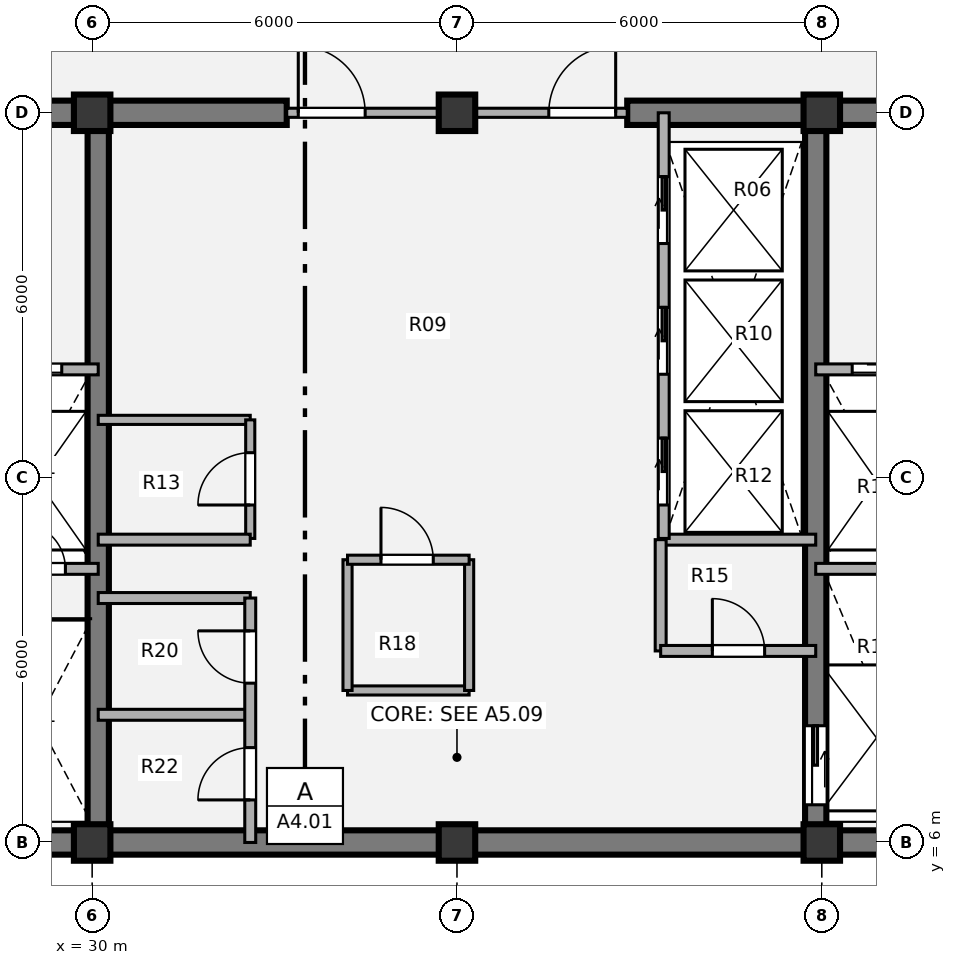
"""IFC4 building model, lengths in metres.
Left out: names, types, materials, properties, quantities, classifications, styles, units other than length and angle.
Written with IfcOpenShell. Run it as: python <this file> out.ifc"""

import sys

from ifc_helpers import new_model, si_unit, direction, frame, frame_2d, origin, origin_2d, place, context, subcontext, project, spatial, rectangle, extrude, source, transform, mapped, element, fill, save


model = new_model("IFC4")
c1 = context("Model", 3, precision=1e-05, world=origin(), true_north=direction((0.0, 1.0)))
c2 = subcontext(c1, "Body", "Model", "MODEL_VIEW")
j1 = project(units=[si_unit("LENGTHUNIT", "METRE"), si_unit("PLANEANGLEUNIT", "RADIAN")], contexts=[c1])
p1 = place(None, origin())
s1 = spatial("IfcSite", under=j1, at=p1, CompositionType="ELEMENT")
p2 = place(p1, origin())
s2 = spatial("IfcBuilding", under=s1, at=p2, CompositionType="ELEMENT")
p3 = place(p2, frame((0.0, 0.0, 291.06)))
s3 = spatial("IfcBuildingStorey", under=s2, at=p3, CompositionType="ELEMENT", Elevation=291.06)
m1 = source(origin(), c2, "Body", "SweptSolid", [
    extrude(rectangle(XDim=0.6, YDim=0.6, at=origin_2d()), origin(), (0.0, 0.0, 1.0), 4.86),
])
for number, where, z_axis, x_axis in (
    (1, (30.0, 6.0, 0.0), (0.0, 0.0, 1.0), (1.0, 0.0, 0.0)),
    (2, (36.0, 6.0, 0.0), (0.0, 0.0, 1.0), (1.0, 0.0, 0.0)),
    (3, (42.0, 6.0, 0.0), (0.0, 0.0, 1.0), (1.0, 0.0, 0.0)),
    (4, (30.0, 18.0, 0.0), (0.0, 0.0, 1.0), (1.0, 0.0, 0.0)),
    (5, (36.0, 18.0, 0.0), (0.0, 0.0, 1.0), (1.0, 0.0, 0.0)),
    (6, (42.0, 18.0, 0.0), (0.0, 0.0, 1.0), (1.0, 0.0, 0.0)),
):
    element("IfcColumn", number, at=place(p3, frame(where, z_axis=z_axis, x_axis=x_axis)), inside=s3, PredefinedType="COLUMN", context=c2, shape_type="MappedRepresentation", body=[
        mapped(m1, transform((0.0, 0.0, 0.0), x_axis=(1.0, 0.0, 0.0), y_axis=(0.0, 1.0, 0.0), z_axis=(0.0, 0.0, 1.0), scale=1.0)),
    ])
p4 = place(p3, frame((48.2, 6.0, 0.0), z_axis=(0.0, 0.0, 1.0), x_axis=(-1.0, 0.0, 0.0)))
e7 = element("IfcWall", 7, at=p4, inside=s3, PredefinedType="SHEAR", context=c2, shape_type="SweptSolid", body=[
    extrude(rectangle(XDim=24.4, YDim=0.4, at=frame_2d((12.2, 0.0))), origin(), (0.0, 0.0, 1.0), 4.86),
])
p5 = place(p3, frame((23.8, 18.0, 0.0), z_axis=(0.0, 0.0, 1.0), x_axis=(1.0, 0.0, 0.0)))
e8 = element("IfcWall", 8, at=p5, inside=s3, PredefinedType="SHEAR", context=c2, shape_type="SweptSolid", body=[
    extrude(rectangle(XDim=9.4, YDim=0.4, at=frame_2d((4.7, 0.0))), origin(), (0.0, 0.0, 1.0), 4.86),
])
p6 = place(p5, frame((2.95, 0.0, 0.0)))
e9 = element("IfcOpeningElement", 9, at=p6, cuts=e8, PredefinedType="OPENING", context=c2, shape_type="SweptSolid", body=[
    extrude(rectangle(XDim=1.1, YDim=2.1, at=origin_2d()), frame((0.55, 0.21, 1.05), z_axis=(0.0, -1.0, 0.0), x_axis=(1.0, 0.0, 0.0)), (0.0, 0.0, 1.0), 0.42),
])
p7 = place(p3, frame((38.8, 18.0, 0.0), z_axis=(0.0, 0.0, 1.0), x_axis=(1.0, 0.0, 0.0)))
e10 = element("IfcWall", 10, at=p7, inside=s3, PredefinedType="SHEAR", context=c2, shape_type="SweptSolid", body=[
    extrude(rectangle(XDim=9.4, YDim=0.4, at=frame_2d((4.7, 0.0))), origin(), (0.0, 0.0, 1.0), 4.86),
])
p8 = place(p7, frame((5.45, 0.0, 0.0)))
e11 = element("IfcOpeningElement", 11, at=p8, cuts=e10, PredefinedType="OPENING", context=c2, shape_type="SweptSolid", body=[
    extrude(rectangle(XDim=1.1, YDim=2.1, at=origin_2d()), frame((0.55, 0.21, 1.05), z_axis=(0.0, -1.0, 0.0), x_axis=(1.0, 0.0, 0.0)), (0.0, 0.0, 1.0), 0.42),
])
p9 = place(p3, frame((30.1, 6.0, 0.0), z_axis=(0.0, 0.0, 1.0), x_axis=(0.0, 1.0, 0.0)))
e12 = element("IfcWall", 12, at=p9, inside=s3, PredefinedType="SHEAR", context=c2, shape_type="SweptSolid", body=[
    extrude(rectangle(XDim=12.0, YDim=0.35, at=frame_2d((6.0, 0.0))), origin(), (0.0, 0.0, 1.0), 4.86),
])
p10 = place(p3, frame((41.9, 18.0, 0.0), z_axis=(0.0, 0.0, 1.0), x_axis=(0.0, -1.0, 0.0)))
e13 = element("IfcWall", 13, at=p10, inside=s3, PredefinedType="SHEAR", context=c2, shape_type="SweptSolid", body=[
    extrude(rectangle(XDim=12.0, YDim=0.35, at=frame_2d((6.0, 0.0))), origin(), (0.0, 0.0, 1.0), 4.86),
])
p11 = place(p10, frame((10.08, 0.0, 0.0)))
e14 = element("IfcOpeningElement", 14, at=p11, cuts=e13, PredefinedType="OPENING", context=c2, shape_type="SweptSolid", body=[
    extrude(rectangle(XDim=1.3, YDim=2.1, at=origin_2d()), frame((0.65, 0.185, 1.05), z_axis=(0.0, -1.0, 0.0), x_axis=(1.0, 0.0, 0.0)), (0.0, 0.0, 1.0), 0.37),
])
p12 = place(p3, frame((30.1, 12.95, 0.0), z_axis=(0.0, 0.0, 1.0), x_axis=(1.0, 0.0, 0.0)))
e15 = element("IfcWall", 15, at=p12, inside=s3, PredefinedType="PARTITIONING", context=c2, shape_type="SweptSolid", body=[
    extrude(rectangle(XDim=2.5, YDim=0.15, at=frame_2d((1.25, 0.0))), origin(), (0.0, 0.0, 1.0), 4.58),
])
p13 = place(p3, frame((32.6, 11.0, 0.0), z_axis=(0.0, 0.0, 1.0), x_axis=(0.0, 1.0, 0.0)))
e16 = element("IfcWall", 16, at=p13, inside=s3, PredefinedType="PARTITIONING", context=c2, shape_type="SweptSolid", body=[
    extrude(rectangle(XDim=1.95, YDim=0.15, at=frame_2d((0.975, 0.0))), origin(), (0.0, 0.0, 1.0), 4.58),
])
p14 = place(p13, frame((0.55, 0.0, 0.0)))
e17 = element("IfcOpeningElement", 17, at=p14, cuts=e16, PredefinedType="OPENING", context=c2, shape_type="SweptSolid", body=[
    extrude(rectangle(XDim=0.86, YDim=2.1, at=origin_2d()), frame((0.43, 0.085, 1.05), z_axis=(0.0, -1.0, 0.0), x_axis=(1.0, 0.0, 0.0)), (0.0, 0.0, 1.0), 0.17),
])
p15 = place(p3, frame((34.2, 8.5, 0.0), z_axis=(0.0, 0.0, 1.0), x_axis=(1.0, 0.0, 0.0)))
e18 = element("IfcWall", 18, at=p15, inside=s3, PredefinedType="PARTITIONING", context=c2, shape_type="SweptSolid", body=[
    extrude(rectangle(XDim=2.0, YDim=0.15, at=frame_2d((1.0, 0.0))), origin(), (0.0, 0.0, 1.0), 4.58),
])
p16 = place(p3, frame((34.2, 8.5, 0.0), z_axis=(0.0, 0.0, 1.0), x_axis=(0.0, 1.0, 0.0)))
e19 = element("IfcWall", 19, at=p16, inside=s3, PredefinedType="PARTITIONING", context=c2, shape_type="SweptSolid", body=[
    extrude(rectangle(XDim=2.15, YDim=0.15, at=frame_2d((1.075, 0.0))), origin(), (0.0, 0.0, 1.0), 4.58),
])
p17 = place(p3, frame((36.2, 8.5, 0.0), z_axis=(0.0, 0.0, 1.0), x_axis=(0.0, 1.0, 0.0)))
e20 = element("IfcWall", 20, at=p17, inside=s3, PredefinedType="PARTITIONING", context=c2, shape_type="SweptSolid", body=[
    extrude(rectangle(XDim=2.15, YDim=0.15, at=frame_2d((1.075, 0.0))), origin(), (0.0, 0.0, 1.0), 3.795),
])
p18 = place(p3, frame((34.2, 10.65, 0.0), z_axis=(0.0, 0.0, 1.0), x_axis=(1.0, 0.0, 0.0)))
e21 = element("IfcWall", 21, at=p18, inside=s3, PredefinedType="PARTITIONING", context=c2, shape_type="SweptSolid", body=[
    extrude(rectangle(XDim=2.0, YDim=0.15, at=frame_2d((1.0, 0.0))), origin(), (0.0, 0.0, 1.0), 4.58),
])
p19 = place(p18, frame((0.55, 0.0, 0.0)))
e22 = element("IfcOpeningElement", 22, at=p19, cuts=e21, PredefinedType="OPENING", context=c2, shape_type="SweptSolid", body=[
    extrude(rectangle(XDim=0.86, YDim=2.1, at=origin_2d()), frame((0.43, 0.085, 1.05), z_axis=(0.0, -1.0, 0.0), x_axis=(1.0, 0.0, 0.0)), (0.0, 0.0, 1.0), 0.17),
])
p20 = place(p3, frame((30.1, 10.98, 0.0), z_axis=(0.0, 0.0, 1.0), x_axis=(1.0, 0.0, 0.0)))
e23 = element("IfcWall", 23, at=p20, inside=s3, PredefinedType="PARTITIONING", context=c2, shape_type="SweptSolid", body=[
    extrude(rectangle(XDim=2.5, YDim=0.18, at=frame_2d((1.25, 0.0))), origin(), (0.0, 0.0, 1.0), 4.58),
])
p21 = place(p3, frame((39.35, 10.98, 0.0), z_axis=(0.0, 0.0, 1.0), x_axis=(1.0, 0.0, 0.0)))
e24 = element("IfcWall", 24, at=p21, inside=s3, PredefinedType="PARTITIONING", context=c2, shape_type="SweptSolid", body=[
    extrude(rectangle(XDim=2.55, YDim=0.18, at=frame_2d((1.275, 0.0))), origin(), (0.0, 0.0, 1.0), 4.58),
])
for number, where, z_axis, x_axis in (
    (25, (30.1, 8.1, 0.0), (0.0, 0.0, 1.0), (1.0, 0.0, 0.0)),
    (26, (30.1, 10.02, 0.0), (0.0, 0.0, 1.0), (1.0, 0.0, 0.0)),
):
    element("IfcWall", number, at=place(p3, frame(where, z_axis=z_axis, x_axis=x_axis)), inside=s3, PredefinedType="PARTITIONING", context=c2, shape_type="SweptSolid", body=[
        extrude(rectangle(XDim=2.5, YDim=0.18, at=frame_2d((1.25, 0.0))), origin(), (0.0, 0.0, 1.0), 4.58),
    ])
p22 = place(p3, frame((32.6, 6.0, 0.0), z_axis=(0.0, 0.0, 1.0), x_axis=(0.0, 1.0, 0.0)))
e27 = element("IfcWall", 27, at=p22, inside=s3, PredefinedType="PARTITIONING", context=c2, shape_type="SweptSolid", body=[
    extrude(rectangle(XDim=4.02, YDim=0.18, at=frame_2d((2.01, 0.0))), origin(), (0.0, 0.0, 1.0), 4.58),
])
p23 = place(p22, frame((0.7, 0.0, 0.0)))
e28 = element("IfcOpeningElement", 28, at=p23, cuts=e27, PredefinedType="OPENING", context=c2, shape_type="SweptSolid", body=[
    extrude(rectangle(XDim=0.86, YDim=2.1, at=origin_2d()), frame((0.43, 0.1, 1.05), z_axis=(0.0, -1.0, 0.0), x_axis=(1.0, 0.0, 0.0)), (0.0, 0.0, 1.0), 0.2),
])
p24 = place(p22, frame((2.62, 0.0, 0.0)))
e29 = element("IfcOpeningElement", 29, at=p24, cuts=e27, PredefinedType="OPENING", context=c2, shape_type="SweptSolid", body=[
    extrude(rectangle(XDim=0.86, YDim=2.1, at=origin_2d()), frame((0.43, 0.1, 1.05), z_axis=(0.0, -1.0, 0.0), x_axis=(1.0, 0.0, 0.0)), (0.0, 0.0, 1.0), 0.2),
])
p25 = place(p3, frame((39.35, 9.15, 0.0), z_axis=(0.0, 0.0, 1.0), x_axis=(0.0, 1.0, 0.0)))
e30 = element("IfcWall", 30, at=p25, inside=s3, PredefinedType="PARTITIONING", context=c2, shape_type="SweptSolid", body=[
    extrude(rectangle(XDim=1.83, YDim=0.18, at=frame_2d((0.915, 0.0))), origin(), (0.0, 0.0, 1.0), 4.58),
])
p26 = place(p3, frame((39.35, 9.15, 0.0), z_axis=(0.0, 0.0, 1.0), x_axis=(1.0, 0.0, 0.0)))
e31 = element("IfcWall", 31, at=p26, inside=s3, PredefinedType="PARTITIONING", context=c2, shape_type="SweptSolid", body=[
    extrude(rectangle(XDim=2.55, YDim=0.18, at=frame_2d((1.275, 0.0))), origin(), (0.0, 0.0, 1.0), 4.58),
])
p27 = place(p26, frame((0.85, 0.0, 0.0)))
e32 = element("IfcOpeningElement", 32, at=p27, cuts=e31, PredefinedType="OPENING", context=c2, shape_type="SweptSolid", body=[
    extrude(rectangle(XDim=0.86, YDim=2.1, at=origin_2d()), frame((0.43, 0.1, 1.05), z_axis=(0.0, -1.0, 0.0), x_axis=(1.0, 0.0, 0.0)), (0.0, 0.0, 1.0), 0.2),
])
p28 = place(p3, frame((33.2, 18.0, 0.0), z_axis=(0.0, 0.0, 1.0), x_axis=(1.0, 0.0, 0.0)))
e33 = element("IfcWall", 33, at=p28, inside=s3, PredefinedType="PARTITIONING", context=c2, shape_type="SweptSolid", body=[
    extrude(rectangle(XDim=5.6, YDim=0.15, at=frame_2d((2.8, 0.0))), origin(), (0.0, 0.0, 1.0), 3.595),
])
p29 = place(p28, frame((0.19, 0.0, 0.0)))
e34 = element("IfcOpeningElement", 34, at=p29, cuts=e33, PredefinedType="OPENING", context=c2, shape_type="SweptSolid", body=[
    extrude(rectangle(XDim=1.1, YDim=2.1, at=origin_2d()), frame((0.55, 0.085, 1.05), z_axis=(0.0, -1.0, 0.0), x_axis=(1.0, 0.0, 0.0)), (0.0, 0.0, 1.0), 0.17),
])
p30 = place(p28, frame((4.31, 0.0, 0.0)))
e35 = element("IfcOpeningElement", 35, at=p30, cuts=e33, PredefinedType="OPENING", context=c2, shape_type="SweptSolid", body=[
    extrude(rectangle(XDim=1.1, YDim=2.1, at=origin_2d()), frame((0.55, 0.085, 1.05), z_axis=(0.0, -1.0, 0.0), x_axis=(1.0, 0.0, 0.0)), (0.0, 0.0, 1.0), 0.17),
])
p31 = place(p3, frame((24.0, 13.78, 0.0), z_axis=(0.0, 0.0, 1.0), x_axis=(1.0, 0.0, 0.0)))
e36 = element("IfcWall", 36, at=p31, inside=s3, PredefinedType="PARTITIONING", context=c2, shape_type="SweptSolid", body=[
    extrude(rectangle(XDim=6.1, YDim=0.18, at=frame_2d((3.05, 0.0))), origin(), (0.0, 0.0, 1.0), 4.58),
])
p32 = place(p31, frame((1.15, 0.0, 0.0)))
e37 = element("IfcOpeningElement", 37, at=p32, cuts=e36, PredefinedType="OPENING", context=c2, shape_type="SweptSolid", body=[
    extrude(rectangle(XDim=1.1, YDim=2.1, at=origin_2d()), frame((0.55, 0.1, 1.05), z_axis=(0.0, -1.0, 0.0), x_axis=(1.0, 0.0, 0.0)), (0.0, 0.0, 1.0), 0.2),
])
p33 = place(p31, frame((4.4, 0.0, 0.0)))
e38 = element("IfcOpeningElement", 38, at=p33, cuts=e36, PredefinedType="OPENING", context=c2, shape_type="SweptSolid", body=[
    extrude(rectangle(XDim=1.1, YDim=2.1, at=origin_2d()), frame((0.55, 0.1, 1.05), z_axis=(0.0, -1.0, 0.0), x_axis=(1.0, 0.0, 0.0)), (0.0, 0.0, 1.0), 0.2),
])
p34 = place(p3, frame((28.15, 10.5, 0.0), z_axis=(0.0, 0.0, 1.0), x_axis=(1.0, 0.0, 0.0)))
e39 = element("IfcWall", 39, at=p34, inside=s3, PredefinedType="PARTITIONING", context=c2, shape_type="SweptSolid", body=[
    extrude(rectangle(XDim=1.95, YDim=0.18, at=frame_2d((0.975, 0.0))), origin(), (0.0, 0.0, 1.0), 4.58),
])
p35 = place(p34, frame((0.65, 0.0, 0.0)))
e40 = element("IfcOpeningElement", 40, at=p35, cuts=e39, PredefinedType="OPENING", context=c2, shape_type="SweptSolid", body=[
    extrude(rectangle(XDim=0.76, YDim=2.05, at=origin_2d()), frame((0.38, 0.1, 1.025), z_axis=(0.0, -1.0, 0.0), x_axis=(1.0, 0.0, 0.0)), (0.0, 0.0, 1.0), 0.2),
])
p36 = place(p3, frame((41.9, 13.78, 0.0), z_axis=(0.0, 0.0, 1.0), x_axis=(1.0, 0.0, 0.0)))
e41 = element("IfcWall", 41, at=p36, inside=s3, PredefinedType="PARTITIONING", context=c2, shape_type="SweptSolid", body=[
    extrude(rectangle(XDim=6.1, YDim=0.18, at=frame_2d((3.05, 0.0))), origin(), (0.0, 0.0, 1.0), 4.58),
])
p37 = place(p36, frame((0.6, 0.0, 0.0)))
e42 = element("IfcOpeningElement", 42, at=p37, cuts=e41, PredefinedType="OPENING", context=c2, shape_type="SweptSolid", body=[
    extrude(rectangle(XDim=1.1, YDim=2.1, at=origin_2d()), frame((0.55, 0.1, 1.05), z_axis=(0.0, -1.0, 0.0), x_axis=(1.0, 0.0, 0.0)), (0.0, 0.0, 1.0), 0.2),
])
p38 = place(p36, frame((3.8, 0.0, 0.0)))
e43 = element("IfcOpeningElement", 43, at=p38, cuts=e41, PredefinedType="OPENING", context=c2, shape_type="SweptSolid", body=[
    extrude(rectangle(XDim=1.1, YDim=2.1, at=origin_2d()), frame((0.55, 0.1, 1.05), z_axis=(0.0, -1.0, 0.0), x_axis=(1.0, 0.0, 0.0)), (0.0, 0.0, 1.0), 0.2),
])
p39 = place(p3, frame((41.9, 10.5, 0.0), z_axis=(0.0, 0.0, 1.0), x_axis=(1.0, 0.0, 0.0)))
e44 = element("IfcWall", 44, at=p39, inside=s3, PredefinedType="PARTITIONING", context=c2, shape_type="SweptSolid", body=[
    extrude(rectangle(XDim=1.95, YDim=0.18, at=frame_2d((0.975, 0.0))), origin(), (0.0, 0.0, 1.0), 4.58),
])
p40 = place(p3, frame((39.4, 11.0, 0.0), z_axis=(0.0, 0.0, 1.0), x_axis=(0.0, 1.0, 0.0)))
e45 = element("IfcWall", 45, at=p40, inside=s3, PredefinedType="PARTITIONING", context=c2, shape_type="SweptSolid", body=[
    extrude(rectangle(XDim=7.0, YDim=0.18, at=frame_2d((3.5, 0.0))), origin(), (0.0, 0.0, 1.0), 4.58),
])
p41 = place(p40, frame((0.55, 0.0, 0.0)))
e46 = element("IfcOpeningElement", 46, at=p41, cuts=e45, PredefinedType="OPENING", context=c2, shape_type="SweptSolid", body=[
    extrude(rectangle(XDim=1.1, YDim=2.1, at=origin_2d()), frame((0.55, 0.1, 1.05), z_axis=(0.0, -1.0, 0.0), x_axis=(1.0, 0.0, 0.0)), (0.0, 0.0, 1.0), 0.2),
])
p42 = place(p40, frame((2.7, 0.0, 0.0)))
e47 = element("IfcOpeningElement", 47, at=p42, cuts=e45, PredefinedType="OPENING", context=c2, shape_type="SweptSolid", body=[
    extrude(rectangle(XDim=1.1, YDim=2.1, at=origin_2d()), frame((0.55, 0.1, 1.05), z_axis=(0.0, -1.0, 0.0), x_axis=(1.0, 0.0, 0.0)), (0.0, 0.0, 1.0), 0.2),
])
p43 = place(p40, frame((4.85, 0.0, 0.0)))
e48 = element("IfcOpeningElement", 48, at=p43, cuts=e45, PredefinedType="OPENING", context=c2, shape_type="SweptSolid", body=[
    extrude(rectangle(XDim=1.1, YDim=2.1, at=origin_2d()), frame((0.55, 0.1, 1.05), z_axis=(0.0, -1.0, 0.0), x_axis=(1.0, 0.0, 0.0)), (0.0, 0.0, 1.0), 0.2),
])
m2 = source(origin(), c2, "Body", "SweptSolid", [
    extrude(rectangle(XDim=0.86, YDim=2.1, at=origin_2d()), frame((0.43, 0.025, 1.05), z_axis=(0.0, -1.0, 0.0), x_axis=(1.0, 0.0, 0.0)), (0.0, 0.0, 1.0), 0.05),
])
p44 = place(p14, origin())
e49 = element("IfcDoor", 49, at=p44, inside=s3, OperationType="SINGLE_SWING_LEFT", PredefinedType="DOOR", context=c2, shape_type="MappedRepresentation", body=[
    mapped(m2, transform((0.0, 0.0, 0.0), x_axis=(1.0, 0.0, 0.0), y_axis=(0.0, 1.0, 0.0), z_axis=(0.0, 0.0, 1.0), scale=1.0)),
])
fill(e17, e49)
p45 = place(p19, origin())
e50 = element("IfcDoor", 50, at=p45, inside=s3, OperationType="SINGLE_SWING_LEFT", PredefinedType="DOOR", context=c2, shape_type="MappedRepresentation", body=[
    mapped(m2, transform((0.0, 0.0, 0.0), x_axis=(1.0, 0.0, 0.0), y_axis=(0.0, 1.0, 0.0), z_axis=(0.0, 0.0, 1.0), scale=1.0)),
])
fill(e22, e50)
p46 = place(p23, origin())
e51 = element("IfcDoor", 51, at=p46, inside=s3, OperationType="SINGLE_SWING_LEFT", PredefinedType="DOOR", context=c2, shape_type="MappedRepresentation", body=[
    mapped(m2, transform((0.0, 0.0, 0.0), x_axis=(1.0, 0.0, 0.0), y_axis=(0.0, 1.0, 0.0), z_axis=(0.0, 0.0, 1.0), scale=1.0)),
])
fill(e28, e51)
p47 = place(p24, origin())
e52 = element("IfcDoor", 52, at=p47, inside=s3, OperationType="SINGLE_SWING_RIGHT", PredefinedType="DOOR", context=c2, shape_type="MappedRepresentation", body=[
    mapped(m2, transform((0.0, 0.0, 0.0), x_axis=(1.0, 0.0, 0.0), y_axis=(0.0, 1.0, 0.0), z_axis=(0.0, 0.0, 1.0), scale=1.0)),
])
fill(e29, e52)
p48 = place(p27, origin())
e53 = element("IfcDoor", 53, at=p48, inside=s3, OperationType="SINGLE_SWING_LEFT", PredefinedType="DOOR", context=c2, shape_type="MappedRepresentation", body=[
    mapped(m2, transform((0.0, 0.0, 0.0), x_axis=(1.0, 0.0, 0.0), y_axis=(0.0, 1.0, 0.0), z_axis=(0.0, 0.0, 1.0), scale=1.0)),
])
fill(e32, e53)
m3 = source(origin(), c2, "Body", "SweptSolid", [
    extrude(rectangle(XDim=1.1, YDim=2.1, at=origin_2d()), frame((0.55, 0.025, 1.05), z_axis=(0.0, -1.0, 0.0), x_axis=(1.0, 0.0, 0.0)), (0.0, 0.0, 1.0), 0.05),
])
p49 = place(p29, origin())
e54 = element("IfcDoor", 54, at=p49, inside=s3, OperationType="SINGLE_SWING_LEFT", PredefinedType="DOOR", context=c2, shape_type="MappedRepresentation", body=[
    mapped(m3, transform((0.0, 0.0, 0.0), x_axis=(1.0, 0.0, 0.0), y_axis=(0.0, 1.0, 0.0), z_axis=(0.0, 0.0, 1.0), scale=1.0)),
])
fill(e34, e54)
p50 = place(p30, origin())
e55 = element("IfcDoor", 55, at=p50, inside=s3, OperationType="SINGLE_SWING_RIGHT", PredefinedType="DOOR", context=c2, shape_type="MappedRepresentation", body=[
    mapped(m3, transform((0.0, 0.0, 0.0), x_axis=(1.0, 0.0, 0.0), y_axis=(0.0, 1.0, 0.0), z_axis=(0.0, 0.0, 1.0), scale=1.0)),
])
fill(e35, e55)
m4 = source(origin(), c2, "Body", "SweptSolid", [
    extrude(rectangle(XDim=1.1, YDim=2.1, at=origin_2d()), frame((0.55, 0.025, 1.05), z_axis=(0.0, -1.0, 0.0), x_axis=(1.0, 0.0, 0.0)), (0.0, 0.0, 1.0), 0.05),
])
p51 = place(p33, origin())
e56 = element("IfcDoor", 56, at=p51, inside=s3, OperationType="SLIDING_TO_LEFT", PredefinedType="DOOR", context=c2, shape_type="MappedRepresentation", body=[
    mapped(m4, transform((0.0, 0.0, 0.0), x_axis=(1.0, 0.0, 0.0), y_axis=(0.0, 1.0, 0.0), z_axis=(0.0, 0.0, 1.0), scale=1.0)),
])
fill(e38, e56)
m5 = source(origin(), c2, "Body", "SweptSolid", [
    extrude(rectangle(XDim=0.76, YDim=2.05, at=origin_2d()), frame((0.38, 0.025, 1.025), z_axis=(0.0, -1.0, 0.0), x_axis=(1.0, 0.0, 0.0)), (0.0, 0.0, 1.0), 0.05),
])
p52 = place(p35, origin())
e57 = element("IfcDoor", 57, at=p52, inside=s3, OperationType="SINGLE_SWING_LEFT", PredefinedType="DOOR", context=c2, shape_type="MappedRepresentation", body=[
    mapped(m5, transform((0.0, 0.0, 0.0), x_axis=(1.0, 0.0, 0.0), y_axis=(0.0, 1.0, 0.0), z_axis=(0.0, 0.0, 1.0), scale=1.0)),
])
fill(e40, e57)
p53 = place(p37, origin())
e58 = element("IfcDoor", 58, at=p53, inside=s3, OperationType="SLIDING_TO_RIGHT", PredefinedType="DOOR", context=c2, shape_type="MappedRepresentation", body=[
    mapped(m4, transform((0.0, 0.0, 0.0), x_axis=(1.0, 0.0, 0.0), y_axis=(0.0, 1.0, 0.0), z_axis=(0.0, 0.0, 1.0), scale=1.0)),
])
fill(e42, e58)
m6 = source(origin(), c2, "Body", "SweptSolid", [
    extrude(rectangle(XDim=1.3, YDim=2.1, at=origin_2d()), frame((0.65, 0.025, 1.05), z_axis=(0.0, -1.0, 0.0), x_axis=(1.0, 0.0, 0.0)), (0.0, 0.0, 1.0), 0.05),
])
p54 = place(p11, origin())
e59 = element("IfcDoor", 59, at=p54, inside=s3, OperationType="SLIDING_TO_LEFT", PredefinedType="DOOR", context=c2, shape_type="MappedRepresentation", body=[
    mapped(m6, transform((0.0, 0.0, 0.0), x_axis=(1.0, 0.0, 0.0), y_axis=(0.0, 1.0, 0.0), z_axis=(0.0, 0.0, 1.0), scale=1.0)),
])
fill(e14, e59)
p55 = place(p41, origin())
e60 = element("IfcDoor", 60, at=p55, inside=s3, OperationType="SLIDING_TO_RIGHT", PredefinedType="DOOR", context=c2, shape_type="MappedRepresentation", body=[
    mapped(m4, transform((0.0, 0.0, 0.0), x_axis=(1.0, 0.0, 0.0), y_axis=(0.0, 1.0, 0.0), z_axis=(0.0, 0.0, 1.0), scale=1.0)),
])
fill(e46, e60)
p56 = place(p42, origin())
e61 = element("IfcDoor", 61, at=p56, inside=s3, OperationType="SLIDING_TO_RIGHT", PredefinedType="DOOR", context=c2, shape_type="MappedRepresentation", body=[
    mapped(m4, transform((0.0, 0.0, 0.0), x_axis=(1.0, 0.0, 0.0), y_axis=(0.0, 1.0, 0.0), z_axis=(0.0, 0.0, 1.0), scale=1.0)),
])
fill(e47, e61)
p57 = place(p43, origin())
e62 = element("IfcDoor", 62, at=p57, inside=s3, OperationType="SLIDING_TO_RIGHT", PredefinedType="DOOR", context=c2, shape_type="MappedRepresentation", body=[
    mapped(m4, transform((0.0, 0.0, 0.0), x_axis=(1.0, 0.0, 0.0), y_axis=(0.0, 1.0, 0.0), z_axis=(0.0, 0.0, 1.0), scale=1.0)),
])
fill(e48, e62)
save(model, sys.argv[1])
